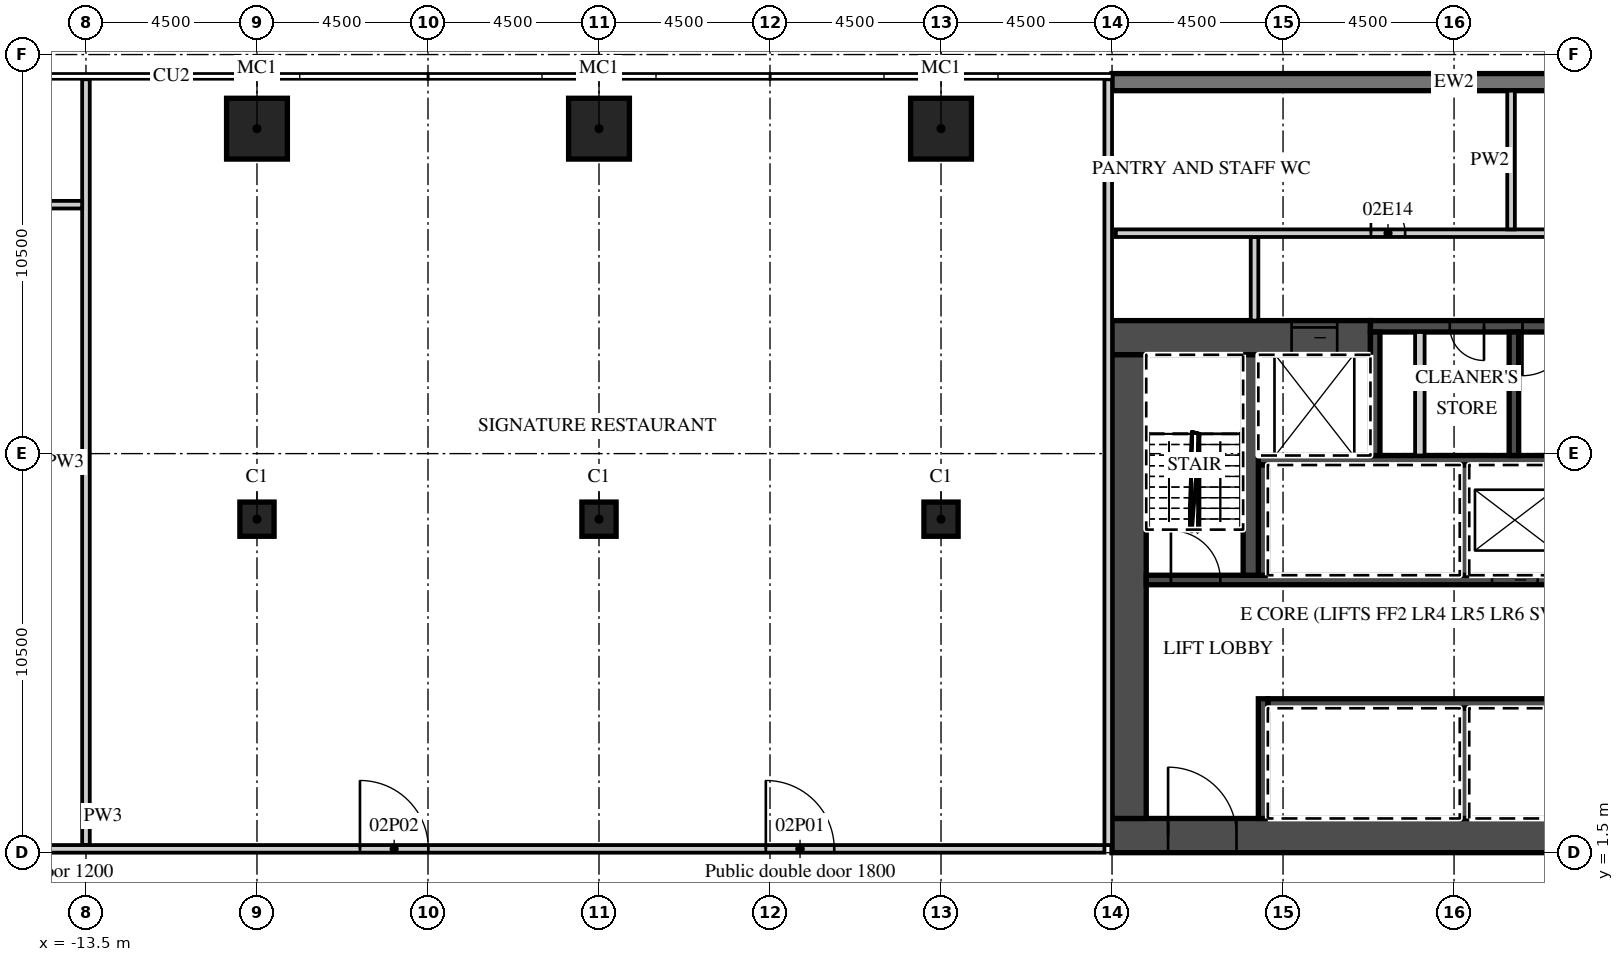
"""IFC4 building model, lengths in metres.
Left out: names, types, materials, properties, quantities, classifications, styles, units other than length and angle.
Written with IfcOpenShell. Run it as: python <this file> out.ifc"""

import sys

from ifc_helpers import new_model, si_unit, direction, frame, frame_2d, origin, origin_2d, place, context, subcontext, project, spatial, rectangle, extrude, element, fill, save


model = new_model("IFC4")
c1 = context("Model", 3, precision=1e-05, world=origin(), true_north=direction((0.0, 1.0)))
c2 = subcontext(c1, "Body", "Model", "MODEL_VIEW")
j1 = project(units=[si_unit("LENGTHUNIT", "METRE"), si_unit("PLANEANGLEUNIT", "RADIAN")], contexts=[c1])
p1 = place(None, origin())
s1 = spatial("IfcSite", under=j1, at=p1, CompositionType="ELEMENT")
p2 = place(p1, origin())
s2 = spatial("IfcBuilding", under=s1, at=p2, CompositionType="ELEMENT")
p3 = place(p2, frame((0.0, 0.0, 17.0)))
s3 = spatial("IfcBuildingStorey", under=s2, at=p3, CompositionType="ELEMENT", Elevation=17.0)
for number, where, z_axis, x_axis in (
    (1, (-9.0, 20.55, 0.0), (0.0, 0.0, 1.0), (1.0, 0.0, 0.0)),
    (2, (0.0, 20.55, 0.0), (0.0, 0.0, 1.0), (1.0, 0.0, 0.0)),
    (3, (9.0, 20.55, 0.0), (0.0, 0.0, 1.0), (1.0, 0.0, 0.0)),
):
    element("IfcColumn", number, at=place(p3, frame(where, z_axis=z_axis, x_axis=x_axis)), inside=s3, PredefinedType="COLUMN", context=c2, shape_type="SweptSolid", body=[
        extrude(rectangle(XDim=1.6, YDim=1.6, at=origin_2d()), origin(), (0.0, 0.0, 1.0), 6.5),
    ])
for number, where, z_axis, x_axis in (
    (4, (-9.0, 10.275, 0.0), (0.0, 0.0, 1.0), (1.0, 0.0, 0.0)),
    (5, (0.0, 10.275, 0.0), (0.0, 0.0, 1.0), (1.0, 0.0, 0.0)),
    (6, (9.0, 10.275, 0.0), (0.0, 0.0, 1.0), (1.0, 0.0, 0.0)),
):
    element("IfcColumn", number, at=place(p3, frame(where, z_axis=z_axis, x_axis=x_axis)), inside=s3, PredefinedType="COLUMN", context=c2, shape_type="SweptSolid", body=[
        extrude(rectangle(XDim=0.9, YDim=0.9, at=origin_2d()), origin(), (0.0, 0.0, 1.0), 6.5),
    ])
p4 = place(p3, frame((31.5, 21.775, 0.0), z_axis=(0.0, 0.0, 1.0), x_axis=(-1.0, 0.0, 0.0)))
e7 = element("IfcWall", 7, at=p4, inside=s3, PredefinedType="SOLIDWALL", context=c2, shape_type="SweptSolid", body=[
    extrude(rectangle(XDim=18.0, YDim=0.45, at=frame_2d((9.0, 0.0))), origin(), (0.0, 0.0, 1.0), 6.05),
])
p5 = place(p3, frame((13.5, 1.95, 0.0), z_axis=(0.0, 0.0, 1.0), x_axis=(1.0, 0.0, 0.0)))
e8 = element("IfcWall", 8, at=p5, inside=s3, PredefinedType="SHEAR", context=c2, shape_type="SweptSolid", body=[
    extrude(rectangle(XDim=18.0, YDim=0.9, at=frame_2d((9.0, 0.0))), origin(), (0.0, 0.0, 1.0), 6.05),
])
p6 = place(p5, frame((1.475, 0.0, 0.0)))
e9 = element("IfcOpeningElement", 9, at=p6, cuts=e8, PredefinedType="OPENING", context=c2, shape_type="SweptSolid", body=[
    extrude(rectangle(XDim=1.8, YDim=2.1, at=frame_2d((0.9, 1.05))), frame((0.0, 0.46, 0.0), z_axis=(0.0, -1.0, 0.0), x_axis=(1.0, 0.0, 0.0)), (0.0, 0.0, 1.0), 0.92),
])
p7 = place(p3, frame((13.5, 15.05, 0.0), z_axis=(0.0, 0.0, 1.0), x_axis=(1.0, 0.0, 0.0)))
e10 = element("IfcWall", 10, at=p7, inside=s3, PredefinedType="SHEAR", context=c2, shape_type="SweptSolid", body=[
    extrude(rectangle(XDim=6.8, YDim=0.9, at=frame_2d((3.4, 0.0))), origin(), (0.0, 0.0, 1.0), 6.05),
])
p8 = place(p7, frame((4.725, 0.0, 0.0)))
e11 = element("IfcOpeningElement", 11, at=p8, cuts=e10, PredefinedType="OPENING", context=c2, shape_type="SweptSolid", body=[
    extrude(rectangle(XDim=1.2, YDim=2.1, at=frame_2d((0.6, 1.05))), frame((0.0, 0.46, 0.0), z_axis=(0.0, -1.0, 0.0), x_axis=(1.0, 0.0, 0.0)), (0.0, 0.0, 1.0), 0.92),
])
p9 = place(p3, frame((20.3, 15.35, 0.0), z_axis=(0.0, 0.0, 1.0), x_axis=(1.0, 0.0, 0.0)))
e12 = element("IfcWall", 12, at=p9, inside=s3, PredefinedType="SHEAR", context=c2, shape_type="SweptSolid", body=[
    extrude(rectangle(XDim=10.3, YDim=0.3, at=frame_2d((5.15, 0.0))), origin(), (0.0, 0.0, 1.0), 6.05),
])
p10 = place(p9, frame((4.0, 0.0, 0.0)))
e13 = element("IfcOpeningElement", 13, at=p10, cuts=e12, PredefinedType="OPENING", context=c2, shape_type="SweptSolid", body=[
    extrude(rectangle(XDim=1.3, YDim=2.1, at=frame_2d((0.65, 1.05))), frame((0.0, 0.16, 0.0), z_axis=(0.0, -1.0, 0.0), x_axis=(1.0, 0.0, 0.0)), (0.0, 0.0, 1.0), 0.32),
])
p11 = place(p9, frame((2.087, 0.0, 0.0)))
e14 = element("IfcOpeningElement", 14, at=p11, cuts=e12, PredefinedType="OPENING", context=c2, shape_type="SweptSolid", body=[
    extrude(rectangle(XDim=0.9, YDim=2.1, at=frame_2d((0.45, 1.05))), frame((0.0, 0.16, 0.0), z_axis=(0.0, -1.0, 0.0), x_axis=(1.0, 0.0, 0.0)), (0.0, 0.0, 1.0), 0.32),
])
p12 = place(p3, frame((13.95, 2.4, 0.0), z_axis=(0.0, 0.0, 1.0), x_axis=(0.0, 1.0, 0.0)))
e15 = element("IfcWall", 15, at=p12, inside=s3, PredefinedType="SHEAR", context=c2, shape_type="SweptSolid", body=[
    extrude(rectangle(XDim=12.2, YDim=0.9, at=frame_2d((6.1, 0.0))), origin(), (0.0, 0.0, 1.0), 6.05),
])
p13 = place(p3, frame((17.6, 5.425, 0.0), z_axis=(0.0, 0.0, 1.0), x_axis=(1.0, 0.0, 0.0)))
e16 = element("IfcWall", 16, at=p13, inside=s3, PredefinedType="SHEAR", context=c2, shape_type="SweptSolid", body=[
    extrude(rectangle(XDim=13.0, YDim=0.25, at=frame_2d((6.5, 0.0))), origin(), (0.0, 0.0, 1.0), 6.05),
])
p14 = place(p3, frame((17.475, 2.4, 0.0), z_axis=(0.0, 0.0, 1.0), x_axis=(0.0, 1.0, 0.0)))
e17 = element("IfcWall", 17, at=p14, inside=s3, PredefinedType="SHEAR", context=c2, shape_type="SweptSolid", body=[
    extrude(rectangle(XDim=3.15, YDim=0.25, at=frame_2d((1.575, 0.0))), origin(), (0.0, 0.0, 1.0), 6.05),
])
p15 = place(p3, frame((22.775, 2.4, 0.0), z_axis=(0.0, 0.0, 1.0), x_axis=(0.0, 1.0, 0.0)))
e18 = element("IfcWall", 18, at=p15, inside=s3, PredefinedType="SHEAR", context=c2, shape_type="SweptSolid", body=[
    extrude(rectangle(XDim=2.9, YDim=0.25, at=frame_2d((1.45, 0.0))), origin(), (0.0, 0.0, 1.0), 6.05),
])
p16 = place(p3, frame((14.4, 8.675, 0.0), z_axis=(0.0, 0.0, 1.0), x_axis=(1.0, 0.0, 0.0)))
e19 = element("IfcWall", 19, at=p16, inside=s3, PredefinedType="SHEAR", context=c2, shape_type="SweptSolid", body=[
    extrude(rectangle(XDim=16.2, YDim=0.25, at=frame_2d((8.1, 0.0))), origin(), (0.0, 0.0, 1.0), 6.05),
])
p17 = place(p16, frame((14.4, 0.0, 0.0)))
e20 = element("IfcOpeningElement", 20, at=p17, cuts=e19, PredefinedType="OPENING", context=c2, shape_type="SweptSolid", body=[
    extrude(rectangle(XDim=1.2, YDim=2.1, at=frame_2d((0.6, 1.05))), frame((0.0, 0.135, 0.0), z_axis=(0.0, -1.0, 0.0), x_axis=(1.0, 0.0, 0.0)), (0.0, 0.0, 1.0), 0.27),
])
p18 = place(p16, frame((11.75, 0.0, 0.0)))
e21 = element("IfcOpeningElement", 21, at=p18, cuts=e19, PredefinedType="OPENING", context=c2, shape_type="SweptSolid", body=[
    extrude(rectangle(XDim=1.2, YDim=2.1, at=frame_2d((0.6, 1.05))), frame((0.0, 0.135, 0.0), z_axis=(0.0, -1.0, 0.0), x_axis=(1.0, 0.0, 0.0)), (0.0, 0.0, 1.0), 0.27),
])
p19 = place(p16, frame((9.1, 0.0, 0.0)))
e22 = element("IfcOpeningElement", 22, at=p19, cuts=e19, PredefinedType="OPENING", context=c2, shape_type="SweptSolid", body=[
    extrude(rectangle(XDim=1.2, YDim=2.1, at=frame_2d((0.6, 1.05))), frame((0.0, 0.135, 0.0), z_axis=(0.0, -1.0, 0.0), x_axis=(1.0, 0.0, 0.0)), (0.0, 0.0, 1.0), 0.27),
])
p20 = place(p16, frame((0.65, 0.0, 0.0)))
e23 = element("IfcOpeningElement", 23, at=p20, cuts=e19, PredefinedType="OPENING", context=c2, shape_type="SweptSolid", body=[
    extrude(rectangle(XDim=1.3, YDim=2.1, at=frame_2d((0.65, 1.05))), frame((0.0, 0.135, 0.0), z_axis=(0.0, -1.0, 0.0), x_axis=(1.0, 0.0, 0.0)), (0.0, 0.0, 1.0), 0.27),
])
p21 = place(p3, frame((17.35, 11.825, 0.0), z_axis=(0.0, 0.0, 1.0), x_axis=(1.0, 0.0, 0.0)))
e24 = element("IfcWall", 24, at=p21, inside=s3, PredefinedType="SHEAR", context=c2, shape_type="SweptSolid", body=[
    extrude(rectangle(XDim=13.25, YDim=0.25, at=frame_2d((6.625, 0.0))), origin(), (0.0, 0.0, 1.0), 6.05),
])
for number, where, z_axis, x_axis in (
    (25, (17.475, 8.8, 0.0), (0.0, 0.0, 1.0), (0.0, 1.0, 0.0)),
    (26, (22.775, 8.8, 0.0), (0.0, 0.0, 1.0), (0.0, 1.0, 0.0)),
):
    element("IfcWall", number, at=place(p3, frame(where, z_axis=z_axis, x_axis=x_axis)), inside=s3, PredefinedType="SHEAR", context=c2, shape_type="SweptSolid", body=[
        extrude(rectangle(XDim=2.9, YDim=0.25, at=frame_2d((1.45, 0.0))), origin(), (0.0, 0.0, 1.0), 6.05),
    ])
p22 = place(p3, frame((17.15, 8.8, 0.0), z_axis=(0.0, 0.0, 1.0), x_axis=(0.0, 1.0, 0.0)))
e27 = element("IfcWall", 27, at=p22, inside=s3, PredefinedType="SHEAR", context=c2, shape_type="SweptSolid", body=[
    extrude(rectangle(XDim=5.8, YDim=0.4, at=frame_2d((2.9, 0.0))), origin(), (0.0, 0.0, 1.0), 6.05),
])
for number, where, z_axis, x_axis in (
    (28, (20.425, 11.95, 0.0), (0.0, 0.0, 1.0), (0.0, 1.0, 0.0)),
    (29, (24.075, 11.95, 0.0), (0.0, 0.0, 1.0), (0.0, 1.0, 0.0)),
):
    element("IfcWall", number, at=place(p3, frame(where, z_axis=z_axis, x_axis=x_axis)), inside=s3, PredefinedType="SHEAR", context=c2, shape_type="SweptSolid", body=[
        extrude(rectangle(XDim=3.25, YDim=0.25, at=frame_2d((1.625, 0.0))), origin(), (0.0, 0.0, 1.0), 6.05),
    ])
p23 = place(p3, frame((21.6, 11.95, 0.0), z_axis=(0.0, 0.0, 1.0), x_axis=(0.0, 1.0, 0.0)))
e30 = element("IfcWall", 30, at=p23, inside=s3, PredefinedType="PARTITIONING", context=c2, shape_type="SweptSolid", body=[
    extrude(rectangle(XDim=3.25, YDim=0.25, at=frame_2d((1.625, 0.0))), origin(), (0.0, 0.0, 1.0), 6.05),
])
p24 = place(p3, frame((17.25, 15.5, 0.0), z_axis=(0.0, 0.0, 1.0), x_axis=(0.0, 1.0, 0.0)))
e31 = element("IfcWall", 31, at=p24, inside=s3, PredefinedType="PARTITIONING", context=c2, shape_type="SweptSolid", body=[
    extrude(rectangle(XDim=2.2, YDim=0.2, at=frame_2d((1.1, 0.0))), origin(), (0.0, 0.0, 1.0), 6.05),
])
p25 = place(p3, frame((13.6, 17.8, 0.0), z_axis=(0.0, 0.0, 1.0), x_axis=(1.0, 0.0, 0.0)))
e32 = element("IfcWall", 32, at=p25, inside=s3, PredefinedType="PARTITIONING", context=c2, shape_type="SweptSolid", body=[
    extrude(rectangle(XDim=30.95, YDim=0.2, at=frame_2d((15.475, 0.0))), origin(), (0.0, 0.0, 1.0), 6.05),
])
p26 = place(p25, frame((15.012, 0.0, 0.0)))
e33 = element("IfcOpeningElement", 33, at=p26, cuts=e32, PredefinedType="OPENING", context=c2, shape_type="SweptSolid", body=[
    extrude(rectangle(XDim=0.9, YDim=2.1, at=frame_2d((0.45, 1.05))), frame((0.0, 0.11, 0.0), z_axis=(0.0, -1.0, 0.0), x_axis=(1.0, 0.0, 0.0)), (0.0, 0.0, 1.0), 0.22),
])
p27 = place(p25, frame((6.712, 0.0, 0.0)))
e34 = element("IfcOpeningElement", 34, at=p27, cuts=e32, PredefinedType="OPENING", context=c2, shape_type="SweptSolid", body=[
    extrude(rectangle(XDim=0.9, YDim=2.1, at=frame_2d((0.45, 1.05))), frame((0.0, 0.11, 0.0), z_axis=(0.0, -1.0, 0.0), x_axis=(1.0, 0.0, 0.0)), (0.0, 0.0, 1.0), 0.22),
])
p28 = place(p3, frame((24.0, 17.9, 0.0), z_axis=(0.0, 0.0, 1.0), x_axis=(0.0, 1.0, 0.0)))
e35 = element("IfcWall", 35, at=p28, inside=s3, PredefinedType="PARTITIONING", context=c2, shape_type="SweptSolid", body=[
    extrude(rectangle(XDim=3.65, YDim=0.2, at=frame_2d((1.825, 0.0))), origin(), (0.0, 0.0, 1.0), 6.05),
])
p29 = place(p3, frame((-13.5, 1.7, 0.0), z_axis=(0.0, 0.0, 1.0), x_axis=(0.0, 1.0, 0.0)))
e36 = element("IfcWall", 36, at=p29, inside=s3, PredefinedType="PARTITIONING", context=c2, shape_type="SweptSolid", body=[
    extrude(rectangle(XDim=20.15, YDim=0.2, at=frame_2d((10.075, 0.0))), origin(), (0.0, 0.0, 1.0), 6.05),
])
p30 = place(p3, frame((-22.4, 18.55, 0.0), z_axis=(0.0, 0.0, 1.0), x_axis=(1.0, 0.0, 0.0)))
e37 = element("IfcWall", 37, at=p30, inside=s3, PredefinedType="PARTITIONING", context=c2, shape_type="SweptSolid", body=[
    extrude(rectangle(XDim=8.8, YDim=0.2, at=frame_2d((4.4, 0.0))), origin(), (0.0, 0.0, 1.0), 6.05),
])
p31 = place(p30, frame((6.525, 0.0, 0.0)))
e38 = element("IfcOpeningElement", 38, at=p31, cuts=e37, PredefinedType="OPENING", context=c2, shape_type="SweptSolid", body=[
    extrude(rectangle(XDim=0.9, YDim=2.1, at=frame_2d((0.45, 1.05))), frame((0.0, 0.11, 0.0), z_axis=(0.0, -1.0, 0.0), x_axis=(1.0, 0.0, 0.0)), (0.0, 0.0, 1.0), 0.22),
])
p32 = place(p3, frame((-39.4, 1.6, 0.0), z_axis=(0.0, 0.0, 1.0), x_axis=(1.0, 0.0, 0.0)))
e39 = element("IfcWall", 39, at=p32, inside=s3, PredefinedType="PARTITIONING", context=c2, shape_type="SweptSolid", body=[
    extrude(rectangle(XDim=52.7, YDim=0.2, at=frame_2d((26.35, 0.0))), origin(), (0.0, 0.0, 1.0), 6.05),
])
p33 = place(p32, frame((43.79, 0.0, 0.0)))
e40 = element("IfcOpeningElement", 40, at=p33, cuts=e39, PredefinedType="OPENING", context=c2, shape_type="SweptSolid", body=[
    extrude(rectangle(XDim=1.8, YDim=2.1, at=frame_2d((0.9, 1.05))), frame((0.0, 0.11, 0.0), z_axis=(0.0, -1.0, 0.0), x_axis=(1.0, 0.0, 0.0)), (0.0, 0.0, 1.0), 0.22),
])
p34 = place(p32, frame((33.11, 0.0, 0.0)))
e41 = element("IfcOpeningElement", 41, at=p34, cuts=e39, PredefinedType="OPENING", context=c2, shape_type="SweptSolid", body=[
    extrude(rectangle(XDim=1.8, YDim=2.1, at=frame_2d((0.9, 1.05))), frame((0.0, 0.11, 0.0), z_axis=(0.0, -1.0, 0.0), x_axis=(1.0, 0.0, 0.0)), (0.0, 0.0, 1.0), 0.22),
])
p35 = place(p32, frame((23.375, 0.0, 0.0)))
e42 = element("IfcOpeningElement", 42, at=p35, cuts=e39, PredefinedType="OPENING", context=c2, shape_type="SweptSolid", body=[
    extrude(rectangle(XDim=1.2, YDim=2.1, at=frame_2d((0.6, 1.05))), frame((0.0, 0.11, 0.0), z_axis=(0.0, -1.0, 0.0), x_axis=(1.0, 0.0, 0.0)), (0.0, 0.0, 1.0), 0.22),
])
p36 = place(p32, frame((11.5, 0.0, 0.0)))
e43 = element("IfcOpeningElement", 43, at=p36, cuts=e39, PredefinedType="OPENING", context=c2, shape_type="SweptSolid", body=[
    extrude(rectangle(XDim=1.8, YDim=2.1, at=frame_2d((0.9, 1.05))), frame((0.0, 0.11, 0.0), z_axis=(0.0, -1.0, 0.0), x_axis=(1.0, 0.0, 0.0)), (0.0, 0.0, 1.0), 0.22),
])
p37 = place(p32, frame((4.7, 0.0, 0.0)))
e44 = element("IfcOpeningElement", 44, at=p37, cuts=e39, PredefinedType="OPENING", context=c2, shape_type="SweptSolid", body=[
    extrude(rectangle(XDim=1.8, YDim=2.1, at=frame_2d((0.9, 1.05))), frame((0.0, 0.11, 0.0), z_axis=(0.0, -1.0, 0.0), x_axis=(1.0, 0.0, 0.0)), (0.0, 0.0, 1.0), 0.22),
])
p38 = place(p32, frame((1.3, 0.0, 0.0)))
e45 = element("IfcOpeningElement", 45, at=p38, cuts=e39, PredefinedType="OPENING", context=c2, shape_type="SweptSolid", body=[
    extrude(rectangle(XDim=1.8, YDim=2.1, at=frame_2d((0.9, 1.05))), frame((0.0, 0.11, 0.0), z_axis=(0.0, -1.0, 0.0), x_axis=(1.0, 0.0, 0.0)), (0.0, 0.0, 1.0), 0.22),
])
p39 = place(p3, frame((13.4, 1.7, 0.0), z_axis=(0.0, 0.0, 1.0), x_axis=(0.0, 1.0, 0.0)))
e46 = element("IfcWall", 46, at=p39, inside=s3, PredefinedType="PARTITIONING", context=c2, shape_type="SweptSolid", body=[
    extrude(rectangle(XDim=20.15, YDim=0.2, at=frame_2d((10.075, 0.0))), origin(), (0.0, 0.0, 1.0), 6.05),
])
p40 = place(p19, origin())
e47 = element("IfcDoor", 47, at=p40, inside=s3, OperationType="SLIDING_TO_RIGHT", PredefinedType="DOOR", context=c2, shape_type="SweptSolid", body=[
    extrude(rectangle(XDim=1.2, YDim=2.1, at=frame_2d((0.6, 1.05))), frame((0.0, 0.025, 0.0), z_axis=(0.0, -1.0, 0.0), x_axis=(1.0, 0.0, 0.0)), (0.0, 0.0, 1.0), 0.05),
])
fill(e22, e47)
p41 = place(p8, origin())
e48 = element("IfcDoor", 48, at=p41, inside=s3, OperationType="SLIDING_TO_LEFT", PredefinedType="DOOR", context=c2, shape_type="SweptSolid", body=[
    extrude(rectangle(XDim=1.2, YDim=2.1, at=frame_2d((0.6, 1.05))), frame((0.0, 0.025, 0.0), z_axis=(0.0, -1.0, 0.0), x_axis=(1.0, 0.0, 0.0)), (0.0, 0.0, 1.0), 0.05),
])
fill(e11, e48)
p42 = place(p6, origin())
e49 = element("IfcDoor", 49, at=p42, inside=s3, OperationType="DOUBLE_DOOR_DOUBLE_SWING", PredefinedType="DOOR", context=c2, shape_type="SweptSolid", body=[
    extrude(rectangle(XDim=1.8, YDim=2.1, at=frame_2d((0.9, 1.05))), frame((0.0, 0.025, 0.0), z_axis=(0.0, -1.0, 0.0), x_axis=(1.0, 0.0, 0.0)), (0.0, 0.0, 1.0), 0.05),
])
fill(e9, e49)
p43 = place(p20, origin())
e50 = element("IfcDoor", 50, at=p43, inside=s3, OperationType="SINGLE_SWING_LEFT", PredefinedType="DOOR", context=c2, shape_type="SweptSolid", body=[
    extrude(rectangle(XDim=1.3, YDim=2.1, at=frame_2d((0.65, 1.05))), frame((0.0, 0.025, 0.0), z_axis=(0.0, -1.0, 0.0), x_axis=(1.0, 0.0, 0.0)), (0.0, 0.0, 1.0), 0.05),
])
fill(e23, e50)
p44 = place(p10, origin())
e51 = element("IfcDoor", 51, at=p44, inside=s3, OperationType="SINGLE_SWING_LEFT", PredefinedType="DOOR", context=c2, shape_type="SweptSolid", body=[
    extrude(rectangle(XDim=1.3, YDim=2.1, at=frame_2d((0.65, 1.05))), frame((0.0, 0.025, 0.0), z_axis=(0.0, -1.0, 0.0), x_axis=(1.0, 0.0, 0.0)), (0.0, 0.0, 1.0), 0.05),
])
fill(e13, e51)
p45 = place(p11, origin())
e52 = element("IfcDoor", 52, at=p45, inside=s3, OperationType="SINGLE_SWING_RIGHT", PredefinedType="DOOR", context=c2, shape_type="SweptSolid", body=[
    extrude(rectangle(XDim=0.9, YDim=2.1, at=frame_2d((0.45, 1.05))), frame((0.0, 0.025, 0.0), z_axis=(0.0, -1.0, 0.0), x_axis=(1.0, 0.0, 0.0)), (0.0, 0.0, 1.0), 0.05),
])
fill(e14, e52)
p46 = place(p27, origin())
e53 = element("IfcDoor", 53, at=p46, inside=s3, OperationType="SINGLE_SWING_LEFT", PredefinedType="DOOR", context=c2, shape_type="SweptSolid", body=[
    extrude(rectangle(XDim=0.9, YDim=2.1, at=frame_2d((0.45, 1.05))), frame((0.0, 0.025, 0.0), z_axis=(0.0, -1.0, 0.0), x_axis=(1.0, 0.0, 0.0)), (0.0, 0.0, 1.0), 0.05),
])
fill(e34, e53)
p47 = place(p33, origin())
e54 = element("IfcDoor", 54, at=p47, inside=s3, OperationType="DOUBLE_DOOR_DOUBLE_SWING", PredefinedType="DOOR", context=c2, shape_type="SweptSolid", body=[
    extrude(rectangle(XDim=1.8, YDim=2.1, at=frame_2d((0.9, 1.05))), frame((0.0, 0.025, 0.0), z_axis=(0.0, -1.0, 0.0), x_axis=(1.0, 0.0, 0.0)), (0.0, 0.0, 1.0), 0.05),
])
fill(e40, e54)
p48 = place(p34, origin())
e55 = element("IfcDoor", 55, at=p48, inside=s3, OperationType="DOUBLE_DOOR_DOUBLE_SWING", PredefinedType="DOOR", context=c2, shape_type="SweptSolid", body=[
    extrude(rectangle(XDim=1.8, YDim=2.1, at=frame_2d((0.9, 1.05))), frame((0.0, 0.025, 0.0), z_axis=(0.0, -1.0, 0.0), x_axis=(1.0, 0.0, 0.0)), (0.0, 0.0, 1.0), 0.05),
])
fill(e41, e55)
save(model, sys.argv[1])
